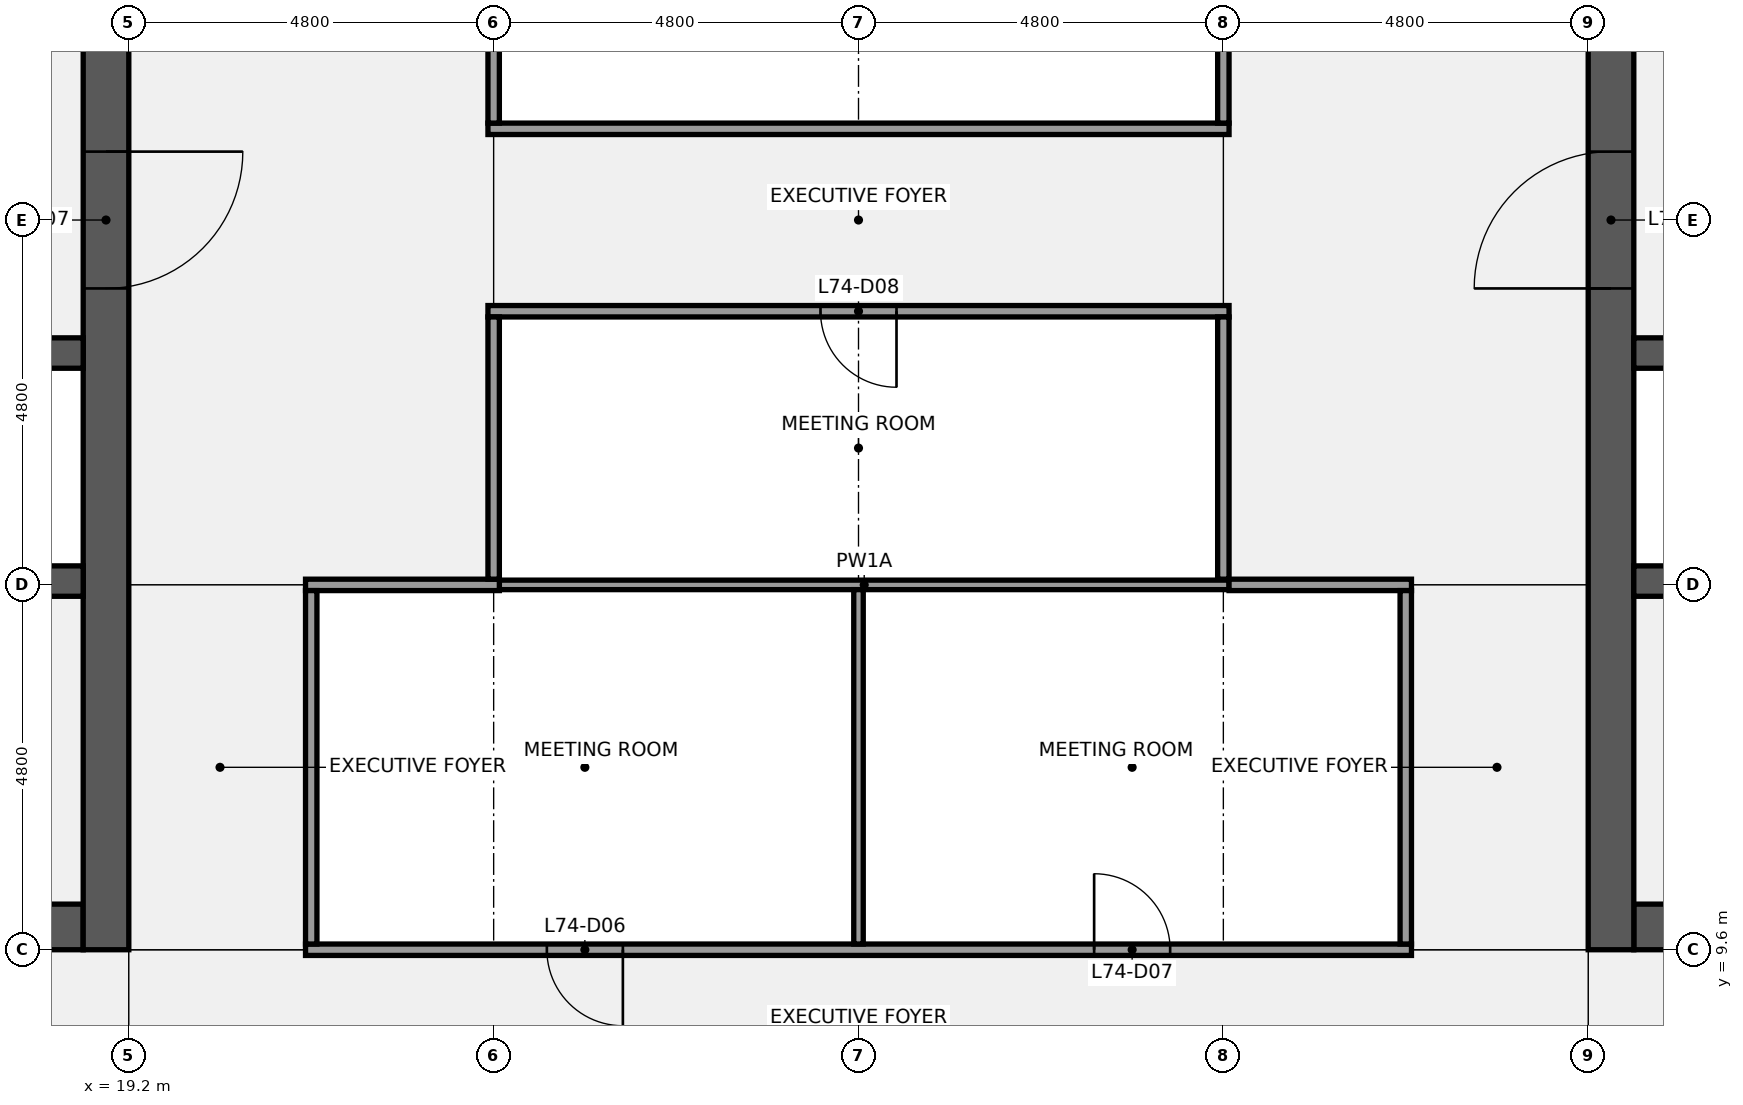
"""IFC4 building model, lengths in metres.
Left out: names, types, materials, properties, quantities, classifications, styles, units other than length and angle.
Written with IfcOpenShell. Run it as: python <this file> out.ifc"""

import sys

from ifc_helpers import new_model, si_unit, direction, frame, frame_2d, origin, place, context, subcontext, project, spatial, rectangle, extrude, element, fill, save


model = new_model("IFC4")
c1 = context("Model", 3, precision=1e-05, world=origin(), true_north=direction((0.0, 1.0)))
c2 = subcontext(c1, "Body", "Model", "MODEL_VIEW")
j1 = project(units=[si_unit("LENGTHUNIT", "METRE"), si_unit("PLANEANGLEUNIT", "RADIAN")], contexts=[c1])
p1 = place(None, origin())
s1 = spatial("IfcSite", under=j1, at=p1, CompositionType="ELEMENT")
p2 = place(p1, origin())
s2 = spatial("IfcBuilding", under=s1, at=p2, CompositionType="ELEMENT")
p3 = place(p2, frame((0.0, 0.0, 334.3)))
s3 = spatial("IfcBuildingStorey", under=s2, at=p3, CompositionType="ELEMENT", Elevation=334.3)
p4 = place(p3, frame((18.6, 9.9, 0.0), z_axis=(0.0, 0.0, 1.0), x_axis=(-1.0, 0.0, 0.0)))
e1 = element("IfcWall", 1, at=p4, inside=s3, PredefinedType="SHEAR", context=c2, shape_type="SweptSolid", body=[
    extrude(rectangle(XDim=4.2, YDim=0.6, at=frame_2d((2.1, 0.0))), origin(), (0.0, 0.0, 1.0), 3.84),
])
p5 = place(p4, frame((1.25, 0.0, 0.0)))
e2 = element("IfcOpeningElement", 2, at=p5, cuts=e1, PredefinedType="OPENING", context=c2, shape_type="SweptSolid", body=[
    extrude(rectangle(XDim=1.1, YDim=2.1, at=frame_2d((0.55, 1.05))), frame((0.0, 0.31, 0.0), z_axis=(0.0, -1.0, 0.0), x_axis=(1.0, 0.0, 0.0)), (0.0, 0.0, 1.0), 0.62),
])
p6 = place(p3, frame((18.9, 38.4, 0.0), z_axis=(0.0, 0.0, 1.0), x_axis=(0.0, -1.0, 0.0)))
e3 = element("IfcWall", 3, at=p6, inside=s3, PredefinedType="SHEAR", context=c2, shape_type="SweptSolid", body=[
    extrude(rectangle(XDim=28.8, YDim=0.6, at=frame_2d((14.4, 0.0))), origin(), (0.0, 0.0, 1.0), 3.84),
])
p7 = place(p6, frame((18.3, 0.0, 0.0)))
e4 = element("IfcOpeningElement", 4, at=p7, cuts=e3, PredefinedType="OPENING", context=c2, shape_type="SweptSolid", body=[
    extrude(rectangle(XDim=1.8, YDim=2.1, at=frame_2d((0.9, 1.05))), frame((0.0, 0.31, 0.0), z_axis=(0.0, -1.0, 0.0), x_axis=(1.0, 0.0, 0.0)), (0.0, 0.0, 1.0), 0.62),
])
p8 = place(p6, frame((8.7, 0.0, 0.0)))
e5 = element("IfcOpeningElement", 5, at=p8, cuts=e3, PredefinedType="OPENING", context=c2, shape_type="SweptSolid", body=[
    extrude(rectangle(XDim=1.8, YDim=2.1, at=frame_2d((0.9, 1.05))), frame((0.0, 0.31, 0.0), z_axis=(0.0, -1.0, 0.0), x_axis=(1.0, 0.0, 0.0)), (0.0, 0.0, 1.0), 0.62),
])
p9 = place(p3, frame((0.6, 14.45, 0.0), z_axis=(0.0, 0.0, 1.0), x_axis=(1.0, 0.0, 0.0)))
e6 = element("IfcWall", 6, at=p9, inside=s3, PredefinedType="SHEAR", context=c2, shape_type="SweptSolid", body=[
    extrude(rectangle(XDim=18.0, YDim=0.4, at=frame_2d((9.0, 0.0))), origin(), (0.0, 0.0, 1.0), 3.84),
])
p10 = place(p3, frame((0.6, 17.45, 0.0), z_axis=(0.0, 0.0, 1.0), x_axis=(1.0, 0.0, 0.0)))
e7 = element("IfcWall", 7, at=p10, inside=s3, PredefinedType="SHEAR", context=c2, shape_type="SweptSolid", body=[
    extrude(rectangle(XDim=18.0, YDim=0.4, at=frame_2d((9.0, 0.0))), origin(), (0.0, 0.0, 1.0), 3.84),
])
p11 = place(p10, frame((1.863, 0.0, 0.0)))
e8 = element("IfcOpeningElement", 8, at=p11, cuts=e7, PredefinedType="OPENING", context=c2, shape_type="SweptSolid", body=[
    extrude(rectangle(XDim=1.0, YDim=2.1, at=frame_2d((0.5, 1.05))), frame((0.0, 0.21, 0.0), z_axis=(0.0, -1.0, 0.0), x_axis=(1.0, 0.0, 0.0)), (0.0, 0.0, 1.0), 0.42),
])
p12 = place(p10, frame((6.1, 0.0, 0.0)))
e9 = element("IfcOpeningElement", 9, at=p12, cuts=e7, PredefinedType="OPENING", context=c2, shape_type="SweptSolid", body=[
    extrude(rectangle(XDim=1.0, YDim=2.1, at=frame_2d((0.5, 1.05))), frame((0.0, 0.21, 0.0), z_axis=(0.0, -1.0, 0.0), x_axis=(1.0, 0.0, 0.0)), (0.0, 0.0, 1.0), 0.42),
])
p13 = place(p10, frame((9.4, 0.0, 0.0)))
e10 = element("IfcOpeningElement", 10, at=p13, cuts=e7, PredefinedType="OPENING", context=c2, shape_type="SweptSolid", body=[
    extrude(rectangle(XDim=1.0, YDim=2.1, at=frame_2d((0.5, 1.05))), frame((0.0, 0.21, 0.0), z_axis=(0.0, -1.0, 0.0), x_axis=(1.0, 0.0, 0.0)), (0.0, 0.0, 1.0), 0.42),
])
p14 = place(p10, frame((12.1, 0.0, 0.0)))
e11 = element("IfcOpeningElement", 11, at=p14, cuts=e7, PredefinedType="OPENING", context=c2, shape_type="SweptSolid", body=[
    extrude(rectangle(XDim=1.0, YDim=2.1, at=frame_2d((0.5, 1.05))), frame((0.0, 0.21, 0.0), z_axis=(0.0, -1.0, 0.0), x_axis=(1.0, 0.0, 0.0)), (0.0, 0.0, 1.0), 0.42),
])
p15 = place(p10, frame((15.438, 0.0, 0.0)))
e12 = element("IfcOpeningElement", 12, at=p15, cuts=e7, PredefinedType="OPENING", context=c2, shape_type="SweptSolid", body=[
    extrude(rectangle(XDim=1.0, YDim=2.1, at=frame_2d((0.5, 1.05))), frame((0.0, 0.21, 0.0), z_axis=(0.0, -1.0, 0.0), x_axis=(1.0, 0.0, 0.0)), (0.0, 0.0, 1.0), 0.42),
])
p16 = place(p3, frame((43.2, 9.9, 0.0), z_axis=(0.0, 0.0, 1.0), x_axis=(-1.0, 0.0, 0.0)))
e13 = element("IfcWall", 13, at=p16, inside=s3, PredefinedType="SHEAR", context=c2, shape_type="SweptSolid", body=[
    extrude(rectangle(XDim=4.2, YDim=0.6, at=frame_2d((2.1, 0.0))), origin(), (0.0, 0.0, 1.0), 3.84),
])
p17 = place(p16, frame((1.85, 0.0, 0.0)))
e14 = element("IfcOpeningElement", 14, at=p17, cuts=e13, PredefinedType="OPENING", context=c2, shape_type="SweptSolid", body=[
    extrude(rectangle(XDim=1.1, YDim=2.1, at=frame_2d((0.55, 1.05))), frame((0.0, 0.31, 0.0), z_axis=(0.0, -1.0, 0.0), x_axis=(1.0, 0.0, 0.0)), (0.0, 0.0, 1.0), 0.62),
])
p18 = place(p3, frame((38.7, 9.6, 0.0), z_axis=(0.0, 0.0, 1.0), x_axis=(0.0, 1.0, 0.0)))
e15 = element("IfcWall", 15, at=p18, inside=s3, PredefinedType="SHEAR", context=c2, shape_type="SweptSolid", body=[
    extrude(rectangle(XDim=28.8, YDim=0.6, at=frame_2d((14.4, 0.0))), origin(), (0.0, 0.0, 1.0), 3.84),
])
p19 = place(p18, frame((8.7, 0.0, 0.0)))
e16 = element("IfcOpeningElement", 16, at=p19, cuts=e15, PredefinedType="OPENING", context=c2, shape_type="SweptSolid", body=[
    extrude(rectangle(XDim=1.8, YDim=2.1, at=frame_2d((0.9, 1.05))), frame((0.0, 0.31, 0.0), z_axis=(0.0, -1.0, 0.0), x_axis=(1.0, 0.0, 0.0)), (0.0, 0.0, 1.0), 0.62),
])
p20 = place(p18, frame((18.3, 0.0, 0.0)))
e17 = element("IfcOpeningElement", 17, at=p20, cuts=e15, PredefinedType="OPENING", context=c2, shape_type="SweptSolid", body=[
    extrude(rectangle(XDim=1.8, YDim=2.1, at=frame_2d((0.9, 1.05))), frame((0.0, 0.31, 0.0), z_axis=(0.0, -1.0, 0.0), x_axis=(1.0, 0.0, 0.0)), (0.0, 0.0, 1.0), 0.62),
])
p21 = place(p3, frame((39.0, 14.45, 0.0), z_axis=(0.0, 0.0, 1.0), x_axis=(1.0, 0.0, 0.0)))
e18 = element("IfcWall", 18, at=p21, inside=s3, PredefinedType="SHEAR", context=c2, shape_type="SweptSolid", body=[
    extrude(rectangle(XDim=18.0, YDim=0.4, at=frame_2d((9.0, 0.0))), origin(), (0.0, 0.0, 1.0), 3.84),
])
p22 = place(p3, frame((39.0, 17.45, 0.0), z_axis=(0.0, 0.0, 1.0), x_axis=(1.0, 0.0, 0.0)))
e19 = element("IfcWall", 19, at=p22, inside=s3, PredefinedType="SHEAR", context=c2, shape_type="SweptSolid", body=[
    extrude(rectangle(XDim=18.0, YDim=0.4, at=frame_2d((9.0, 0.0))), origin(), (0.0, 0.0, 1.0), 3.84),
])
p23 = place(p22, frame((15.137, 0.0, 0.0)))
e20 = element("IfcOpeningElement", 20, at=p23, cuts=e19, PredefinedType="OPENING", context=c2, shape_type="SweptSolid", body=[
    extrude(rectangle(XDim=1.0, YDim=2.1, at=frame_2d((0.5, 1.05))), frame((0.0, 0.21, 0.0), z_axis=(0.0, -1.0, 0.0), x_axis=(1.0, 0.0, 0.0)), (0.0, 0.0, 1.0), 0.42),
])
p24 = place(p22, frame((10.9, 0.0, 0.0)))
e21 = element("IfcOpeningElement", 21, at=p24, cuts=e19, PredefinedType="OPENING", context=c2, shape_type="SweptSolid", body=[
    extrude(rectangle(XDim=1.0, YDim=2.1, at=frame_2d((0.5, 1.05))), frame((0.0, 0.21, 0.0), z_axis=(0.0, -1.0, 0.0), x_axis=(1.0, 0.0, 0.0)), (0.0, 0.0, 1.0), 0.42),
])
p25 = place(p22, frame((7.6, 0.0, 0.0)))
e22 = element("IfcOpeningElement", 22, at=p25, cuts=e19, PredefinedType="OPENING", context=c2, shape_type="SweptSolid", body=[
    extrude(rectangle(XDim=1.0, YDim=2.1, at=frame_2d((0.5, 1.05))), frame((0.0, 0.21, 0.0), z_axis=(0.0, -1.0, 0.0), x_axis=(1.0, 0.0, 0.0)), (0.0, 0.0, 1.0), 0.42),
])
p26 = place(p22, frame((4.9, 0.0, 0.0)))
e23 = element("IfcOpeningElement", 23, at=p26, cuts=e19, PredefinedType="OPENING", context=c2, shape_type="SweptSolid", body=[
    extrude(rectangle(XDim=1.0, YDim=2.1, at=frame_2d((0.5, 1.05))), frame((0.0, 0.21, 0.0), z_axis=(0.0, -1.0, 0.0), x_axis=(1.0, 0.0, 0.0)), (0.0, 0.0, 1.0), 0.42),
])
p27 = place(p22, frame((1.562, 0.0, 0.0)))
e24 = element("IfcOpeningElement", 24, at=p27, cuts=e19, PredefinedType="OPENING", context=c2, shape_type="SweptSolid", body=[
    extrude(rectangle(XDim=1.0, YDim=2.1, at=frame_2d((0.5, 1.05))), frame((0.0, 0.21, 0.0), z_axis=(0.0, -1.0, 0.0), x_axis=(1.0, 0.0, 0.0)), (0.0, 0.0, 1.0), 0.42),
])
p28 = place(p3, frame((21.525, 9.6, 0.0), z_axis=(0.0, 0.0, 1.0), x_axis=(1.0, 0.0, 0.0)))
e25 = element("IfcWall", 25, at=p28, inside=s3, PredefinedType="PARTITIONING", context=c2, shape_type="SweptSolid", body=[
    extrude(rectangle(XDim=14.55, YDim=0.15, at=frame_2d((7.275, 0.0))), origin(), (0.0, 0.0, 1.0), 2.849),
])
p29 = place(p28, frame((3.175, 0.0, 0.0)))
e26 = element("IfcOpeningElement", 26, at=p29, cuts=e25, PredefinedType="OPENING", context=c2, shape_type="SweptSolid", body=[
    extrude(rectangle(XDim=1.0, YDim=2.1, at=frame_2d((0.5, 1.05))), frame((0.0, 0.085, 0.0), z_axis=(0.0, -1.0, 0.0), x_axis=(1.0, 0.0, 0.0)), (0.0, 0.0, 1.0), 0.17),
])
p30 = place(p28, frame((10.375, 0.0, 0.0)))
e27 = element("IfcOpeningElement", 27, at=p30, cuts=e25, PredefinedType="OPENING", context=c2, shape_type="SweptSolid", body=[
    extrude(rectangle(XDim=1.0, YDim=2.1, at=frame_2d((0.5, 1.05))), frame((0.0, 0.085, 0.0), z_axis=(0.0, -1.0, 0.0), x_axis=(1.0, 0.0, 0.0)), (0.0, 0.0, 1.0), 0.17),
])
p31 = place(p3, frame((24.075, 14.4, 0.0), z_axis=(0.0, 0.0, 1.0), x_axis=(1.0, 0.0, 0.0)))
e28 = element("IfcWall", 28, at=p31, inside=s3, PredefinedType="PARTITIONING", context=c2, shape_type="SweptSolid", body=[
    extrude(rectangle(XDim=9.6, YDim=0.125, at=frame_2d((4.8, 0.0))), origin(), (0.0, 0.0, 1.0), 2.849),
])
p32 = place(p3, frame((21.525, 14.4, 0.0), z_axis=(0.0, 0.0, 1.0), x_axis=(1.0, 0.0, 0.0)))
e29 = element("IfcWall", 29, at=p32, inside=s3, PredefinedType="PARTITIONING", context=c2, shape_type="SweptSolid", body=[
    extrude(rectangle(XDim=2.55, YDim=0.15, at=frame_2d((1.275, 0.0))), origin(), (0.0, 0.0, 1.0), 2.849),
])
p33 = place(p3, frame((33.675, 14.4, 0.0), z_axis=(0.0, 0.0, 1.0), x_axis=(1.0, 0.0, 0.0)))
e30 = element("IfcWall", 30, at=p33, inside=s3, PredefinedType="PARTITIONING", context=c2, shape_type="SweptSolid", body=[
    extrude(rectangle(XDim=2.4, YDim=0.15, at=frame_2d((1.2, 0.0))), origin(), (0.0, 0.0, 1.0), 2.849),
])
p34 = place(p3, frame((23.925, 18.0, 0.0), z_axis=(0.0, 0.0, 1.0), x_axis=(1.0, 0.0, 0.0)))
e31 = element("IfcWall", 31, at=p34, inside=s3, PredefinedType="PARTITIONING", context=c2, shape_type="SweptSolid", body=[
    extrude(rectangle(XDim=9.75, YDim=0.15, at=frame_2d((4.875, 0.0))), origin(), (0.0, 0.0, 1.0), 2.849),
])
p35 = place(p34, frame((4.375, 0.0, 0.0)))
e32 = element("IfcOpeningElement", 32, at=p35, cuts=e31, PredefinedType="OPENING", context=c2, shape_type="SweptSolid", body=[
    extrude(rectangle(XDim=1.0, YDim=2.1, at=frame_2d((0.5, 1.05))), frame((0.0, 0.085, 0.0), z_axis=(0.0, -1.0, 0.0), x_axis=(1.0, 0.0, 0.0)), (0.0, 0.0, 1.0), 0.17),
])
p36 = place(p3, frame((23.925, 20.4, 0.0), z_axis=(0.0, 0.0, 1.0), x_axis=(1.0, 0.0, 0.0)))
e33 = element("IfcWall", 33, at=p36, inside=s3, PredefinedType="PARTITIONING", context=c2, shape_type="SweptSolid", body=[
    extrude(rectangle(XDim=9.75, YDim=0.15, at=frame_2d((4.875, 0.0))), origin(), (0.0, 0.0, 1.0), 2.849),
])
p37 = place(p3, frame((21.6, 9.675, 0.0), z_axis=(0.0, 0.0, 1.0), x_axis=(0.0, 1.0, 0.0)))
e34 = element("IfcWall", 34, at=p37, inside=s3, PredefinedType="PARTITIONING", context=c2, shape_type="SweptSolid", body=[
    extrude(rectangle(XDim=4.65, YDim=0.15, at=frame_2d((2.325, 0.0))), origin(), (0.0, 0.0, 1.0), 2.849),
])
p38 = place(p3, frame((24.0, 14.475, 0.0), z_axis=(0.0, 0.0, 1.0), x_axis=(0.0, 1.0, 0.0)))
e35 = element("IfcWall", 35, at=p38, inside=s3, PredefinedType="PARTITIONING", context=c2, shape_type="SweptSolid", body=[
    extrude(rectangle(XDim=3.45, YDim=0.15, at=frame_2d((1.725, 0.0))), origin(), (0.0, 0.0, 1.0), 2.849),
])
p39 = place(p3, frame((24.0, 20.475, 0.0), z_axis=(0.0, 0.0, 1.0), x_axis=(0.0, 1.0, 0.0)))
e36 = element("IfcWall", 36, at=p39, inside=s3, PredefinedType="PARTITIONING", context=c2, shape_type="SweptSolid", body=[
    extrude(rectangle(XDim=13.05, YDim=0.15, at=frame_2d((6.525, 0.0))), origin(), (0.0, 0.0, 1.0), 2.849),
])
p40 = place(p39, frame((6.025, 0.0, 0.0)))
e37 = element("IfcOpeningElement", 37, at=p40, cuts=e36, PredefinedType="OPENING", context=c2, shape_type="SweptSolid", body=[
    extrude(rectangle(XDim=1.0, YDim=2.1, at=frame_2d((0.5, 1.05))), frame((0.0, 0.085, 0.0), z_axis=(0.0, -1.0, 0.0), x_axis=(1.0, 0.0, 0.0)), (0.0, 0.0, 1.0), 0.17),
])
p41 = place(p3, frame((28.8, 9.675, 0.0), z_axis=(0.0, 0.0, 1.0), x_axis=(0.0, 1.0, 0.0)))
e38 = element("IfcWall", 38, at=p41, inside=s3, PredefinedType="PARTITIONING", context=c2, shape_type="SweptSolid", body=[
    extrude(rectangle(XDim=4.662, YDim=0.125, at=frame_2d((2.331, 0.0))), origin(), (0.0, 0.0, 1.0), 2.849),
])
p42 = place(p3, frame((33.6, 14.475, 0.0), z_axis=(0.0, 0.0, 1.0), x_axis=(0.0, 1.0, 0.0)))
e39 = element("IfcWall", 39, at=p42, inside=s3, PredefinedType="PARTITIONING", context=c2, shape_type="SweptSolid", body=[
    extrude(rectangle(XDim=3.45, YDim=0.15, at=frame_2d((1.725, 0.0))), origin(), (0.0, 0.0, 1.0), 2.849),
])
p43 = place(p3, frame((33.6, 20.475, 0.0), z_axis=(0.0, 0.0, 1.0), x_axis=(0.0, 1.0, 0.0)))
e40 = element("IfcWall", 40, at=p43, inside=s3, PredefinedType="PARTITIONING", context=c2, shape_type="SweptSolid", body=[
    extrude(rectangle(XDim=13.05, YDim=0.15, at=frame_2d((6.525, 0.0))), origin(), (0.0, 0.0, 1.0), 2.849),
])
p44 = place(p3, frame((36.0, 9.675, 0.0), z_axis=(0.0, 0.0, 1.0), x_axis=(0.0, 1.0, 0.0)))
e41 = element("IfcWall", 41, at=p44, inside=s3, PredefinedType="PARTITIONING", context=c2, shape_type="SweptSolid", body=[
    extrude(rectangle(XDim=4.65, YDim=0.15, at=frame_2d((2.325, 0.0))), origin(), (0.0, 0.0, 1.0), 2.849),
])
p45 = place(p7, origin())
e42 = element("IfcDoor", 42, at=p45, inside=s3, OperationType="DOUBLE_DOOR_SINGLE_SWING", PredefinedType="DOOR", context=c2, shape_type="SweptSolid", body=[
    extrude(rectangle(XDim=1.8, YDim=2.1, at=frame_2d((0.9, 1.05))), frame((0.0, 0.025, 0.0), z_axis=(0.0, -1.0, 0.0), x_axis=(1.0, 0.0, 0.0)), (0.0, 0.0, 1.0), 0.05),
])
fill(e4, e42)
p46 = place(p19, origin())
e43 = element("IfcDoor", 43, at=p46, inside=s3, OperationType="DOUBLE_DOOR_SINGLE_SWING", PredefinedType="DOOR", context=c2, shape_type="SweptSolid", body=[
    extrude(rectangle(XDim=1.8, YDim=2.1, at=frame_2d((0.9, 1.05))), frame((0.0, 0.025, 0.0), z_axis=(0.0, -1.0, 0.0), x_axis=(1.0, 0.0, 0.0)), (0.0, 0.0, 1.0), 0.05),
])
fill(e16, e43)
p47 = place(p29, origin())
e44 = element("IfcDoor", 44, at=p47, inside=s3, OperationType="SINGLE_SWING_RIGHT", PredefinedType="DOOR", context=c2, shape_type="SweptSolid", body=[
    extrude(rectangle(XDim=1.0, YDim=2.1, at=frame_2d((0.5, 1.05))), frame((0.0, 0.025, 0.0), z_axis=(0.0, -1.0, 0.0), x_axis=(1.0, 0.0, 0.0)), (0.0, 0.0, 1.0), 0.05),
])
fill(e26, e44)
p48 = place(p30, origin())
e45 = element("IfcDoor", 45, at=p48, inside=s3, OperationType="SINGLE_SWING_LEFT", PredefinedType="DOOR", context=c2, shape_type="SweptSolid", body=[
    extrude(rectangle(XDim=1.0, YDim=2.1, at=frame_2d((0.5, 1.05))), frame((0.0, 0.025, 0.0), z_axis=(0.0, -1.0, 0.0), x_axis=(1.0, 0.0, 0.0)), (0.0, 0.0, 1.0), 0.05),
])
fill(e27, e45)
p49 = place(p35, origin())
e46 = element("IfcDoor", 46, at=p49, inside=s3, OperationType="SINGLE_SWING_RIGHT", PredefinedType="DOOR", context=c2, shape_type="SweptSolid", body=[
    extrude(rectangle(XDim=1.0, YDim=2.1, at=frame_2d((0.5, 1.05))), frame((0.0, 0.025, 0.0), z_axis=(0.0, -1.0, 0.0), x_axis=(1.0, 0.0, 0.0)), (0.0, 0.0, 1.0), 0.05),
])
fill(e32, e46)
save(model, sys.argv[1])
